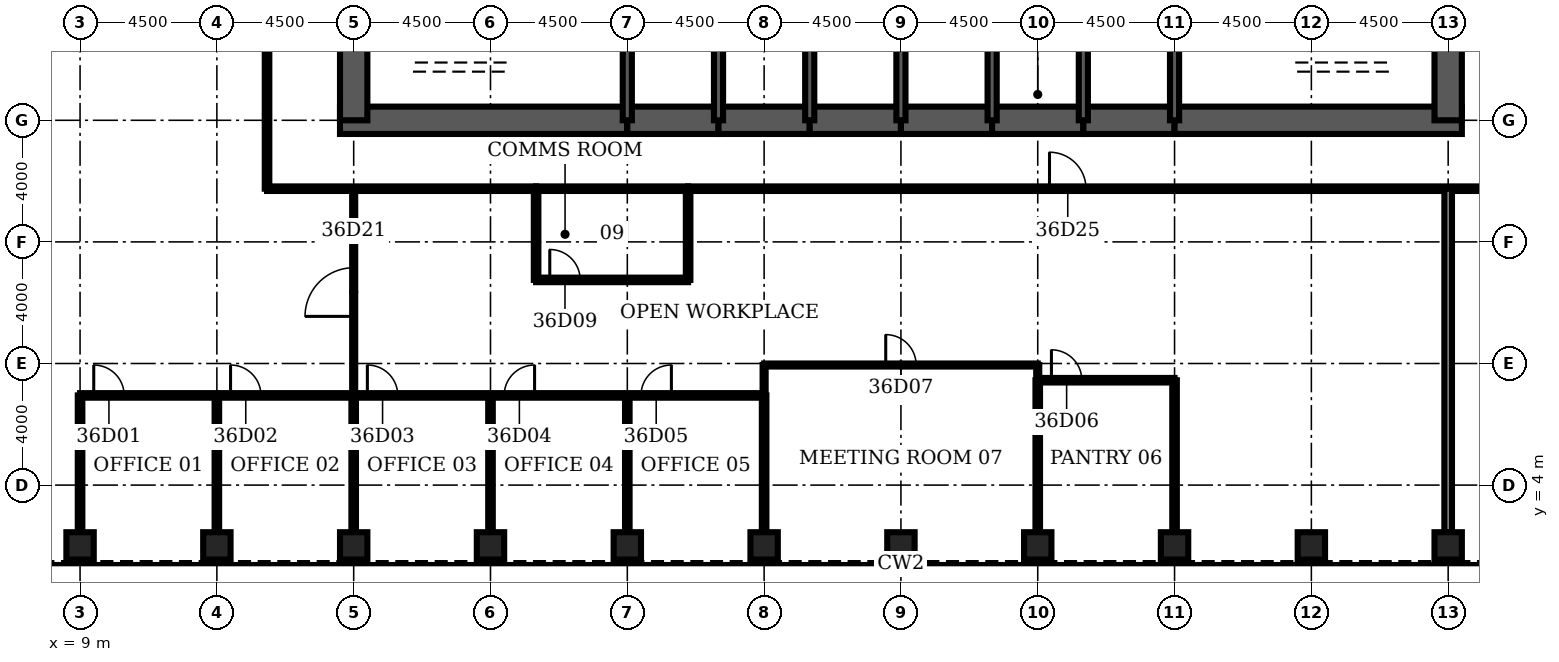
"""IFC4 building model, lengths in metres.
Left out: names, types, materials, properties, quantities, classifications, styles, units other than length and angle.
Written with IfcOpenShell. Run it as: python <this file> out.ifc"""

import sys

from ifc_helpers import new_model, si_unit, direction, frame, frame_2d, origin, origin_2d, place, context, subcontext, project, spatial, rectangle, hollow_rectangle, extrude, element, fill, save


model = new_model("IFC4")
c1 = context("Model", 3, precision=1e-05, world=origin(), true_north=direction((0.0, 1.0)))
c2 = subcontext(c1, "Body", "Model", "MODEL_VIEW")
j1 = project(units=[si_unit("LENGTHUNIT", "METRE"), si_unit("PLANEANGLEUNIT", "RADIAN")], contexts=[c1])
p1 = place(None, origin())
s1 = spatial("IfcSite", under=j1, at=p1, CompositionType="ELEMENT")
p2 = place(p1, origin())
s2 = spatial("IfcBuilding", under=s1, at=p2, CompositionType="ELEMENT")
p3 = place(p2, frame((0.0, 0.0, 163.5)))
s3 = spatial("IfcBuildingStorey", under=s2, at=p3, CompositionType="ELEMENT", Elevation=163.5)
for number, where, z_axis, x_axis in (
    (1, (9.0, 2.0, 0.0), (0.0, 0.0, 1.0), (0.0, 1.0, 0.0)),
    (2, (13.5, 2.0, 0.0), (0.0, 0.0, 1.0), (0.0, 1.0, 0.0)),
    (3, (18.0, 2.0, 0.0), (0.0, 0.0, 1.0), (0.0, 1.0, 0.0)),
    (4, (22.5, 2.0, 0.0), (0.0, 0.0, 1.0), (0.0, 1.0, 0.0)),
    (5, (27.0, 2.0, 0.0), (0.0, 0.0, 1.0), (0.0, 1.0, 0.0)),
    (6, (31.5, 2.0, 0.0), (0.0, 0.0, 1.0), (0.0, 1.0, 0.0)),
    (7, (36.0, 2.0, 0.0), (0.0, 0.0, 1.0), (0.0, 1.0, 0.0)),
    (8, (40.5, 2.0, 0.0), (0.0, 0.0, 1.0), (0.0, 1.0, 0.0)),
    (9, (45.0, 2.0, 0.0), (0.0, 0.0, 1.0), (0.0, 1.0, 0.0)),
    (10, (49.5, 2.0, 0.0), (0.0, 0.0, 1.0), (0.0, 1.0, 0.0)),
    (11, (54.0, 2.0, 0.0), (0.0, 0.0, 1.0), (0.0, 1.0, 0.0)),
):
    element("IfcColumn", number, at=place(p3, frame(where, z_axis=z_axis, x_axis=x_axis)), inside=s3, PredefinedType="COLUMN", context=c2, shape_type="SweptSolid", body=[
        extrude(hollow_rectangle(XDim=0.9, YDim=0.9, WallThickness=0.09, at=origin_2d()), origin(), (0.0, 0.0, 1.0), 4.2),
    ])
p4 = place(p3, frame((17.55, 16.0, 0.0), z_axis=(0.0, 0.0, 1.0), x_axis=(1.0, 0.0, 0.0)))
e12 = element("IfcWall", 12, at=p4, inside=s3, PredefinedType="SHEAR", context=c2, shape_type="SweptSolid", body=[
    extrude(rectangle(XDim=9.45, YDim=0.9, at=frame_2d((4.725, 0.0))), origin(), (0.0, 0.0, 1.0), 4.2),
])
for number, where, z_axis, x_axis in (
    (13, (27.0, 16.0, 0.0), (0.0, 0.0, 1.0), (1.0, 0.0, 0.0)),
    (14, (30.0, 16.0, 0.0), (0.0, 0.0, 1.0), (1.0, 0.0, 0.0)),
    (15, (33.0, 16.0, 0.0), (0.0, 0.0, 1.0), (1.0, 0.0, 0.0)),
    (16, (36.0, 16.0, 0.0), (0.0, 0.0, 1.0), (1.0, 0.0, 0.0)),
    (17, (39.0, 16.0, 0.0), (0.0, 0.0, 1.0), (1.0, 0.0, 0.0)),
    (18, (42.0, 16.0, 0.0), (0.0, 0.0, 1.0), (1.0, 0.0, 0.0)),
):
    element("IfcWall", number, at=place(p3, frame(where, z_axis=z_axis, x_axis=x_axis)), inside=s3, PredefinedType="SHEAR", context=c2, shape_type="SweptSolid", body=[
        extrude(rectangle(XDim=3.0, YDim=0.9, at=frame_2d((1.5, 0.0))), origin(), (0.0, 0.0, 1.0), 4.2),
    ])
p5 = place(p3, frame((45.0, 16.0, 0.0), z_axis=(0.0, 0.0, 1.0), x_axis=(1.0, 0.0, 0.0)))
e19 = element("IfcWall", 19, at=p5, inside=s3, PredefinedType="SHEAR", context=c2, shape_type="SweptSolid", body=[
    extrude(rectangle(XDim=9.45, YDim=0.9, at=frame_2d((4.725, 0.0))), origin(), (0.0, 0.0, 1.0), 4.2),
])
for number, where, z_axis, x_axis in (
    (20, (18.0, 19.2, 0.0), (0.0, 0.0, 1.0), (0.0, -1.0, 0.0)),
    (21, (54.0, 16.0, 0.0), (0.0, 0.0, 1.0), (0.0, 1.0, 0.0)),
):
    element("IfcWall", number, at=place(p3, frame(where, z_axis=z_axis, x_axis=x_axis)), inside=s3, PredefinedType="SHEAR", context=c2, shape_type="SweptSolid", body=[
        extrude(rectangle(XDim=3.2, YDim=0.9, at=frame_2d((1.6, 0.0))), origin(), (0.0, 0.0, 1.0), 4.2),
    ])
for number, where, z_axis, x_axis in (
    (22, (27.0, 16.0, 0.0), (0.0, 0.0, 1.0), (0.0, 1.0, 0.0)),
    (23, (30.0, 16.0, 0.0), (0.0, 0.0, 1.0), (0.0, 1.0, 0.0)),
    (24, (33.0, 16.0, 0.0), (0.0, 0.0, 1.0), (0.0, 1.0, 0.0)),
    (25, (36.0, 16.0, 0.0), (0.0, 0.0, 1.0), (0.0, 1.0, 0.0)),
    (26, (39.0, 16.0, 0.0), (0.0, 0.0, 1.0), (0.0, 1.0, 0.0)),
    (27, (42.0, 16.0, 0.0), (0.0, 0.0, 1.0), (0.0, 1.0, 0.0)),
    (28, (45.0, 16.0, 0.0), (0.0, 0.0, 1.0), (0.0, 1.0, 0.0)),
):
    element("IfcWall", number, at=place(p3, frame(where, z_axis=z_axis, x_axis=x_axis)), inside=s3, PredefinedType="SOLIDWALL", context=c2, shape_type="SweptSolid", body=[
        extrude(rectangle(XDim=3.2, YDim=0.3, at=frame_2d((1.6, 0.0))), origin(), (0.0, 0.0, 1.0), 4.2),
    ])
p6 = place(p3, frame((39.15, 17.4, 0.0), z_axis=(0.0, 0.0, 1.0), x_axis=(1.0, 0.0, 0.0)))
e29 = element("IfcWall", 29, at=p6, inside=s3, PredefinedType="SOLIDWALL", context=c2, shape_type="SweptSolid", body=[
    extrude(rectangle(XDim=2.7, YDim=0.3, at=frame_2d((1.35, 0.0))), origin(), (0.0, 0.0, 1.0), 4.04),
])
p7 = place(p6, frame((0.85, 0.0, 0.0)))
e30 = element("IfcOpeningElement", 30, at=p7, cuts=e29, PredefinedType="OPENING", context=c2, shape_type="SweptSolid", body=[
    extrude(rectangle(XDim=1.0, YDim=2.1, at=frame_2d((0.5, 1.05))), frame((0.0, 0.16, 0.0), z_axis=(0.0, -1.0, 0.0), x_axis=(1.0, 0.0, 0.0)), (0.0, 0.0, 1.0), 0.32),
])
p8 = place(p3, frame((9.0, 6.95, 0.0), z_axis=(0.0, 0.0, 1.0), x_axis=(1.0, 0.0, 0.0)))
e31 = element("IfcWall", 31, at=p8, inside=s3, PredefinedType="PARTITIONING", context=c2, shape_type="SweptSolid", body=[
    extrude(rectangle(XDim=22.5, YDim=0.15, at=frame_2d((11.25, 0.0))), origin(), (0.0, 0.0, 1.0), 3.0),
])
p9 = place(p8, frame((0.45, 0.0, 0.0)))
e32 = element("IfcOpeningElement", 32, at=p9, cuts=e31, PredefinedType="OPENING", context=c2, shape_type="SweptSolid", body=[
    extrude(rectangle(XDim=1.0, YDim=2.1, at=frame_2d((0.5, 1.05))), frame((0.0, 0.085, 0.0), z_axis=(0.0, -1.0, 0.0), x_axis=(1.0, 0.0, 0.0)), (0.0, 0.0, 1.0), 0.17),
])
p10 = place(p8, frame((4.95, 0.0, 0.0)))
e33 = element("IfcOpeningElement", 33, at=p10, cuts=e31, PredefinedType="OPENING", context=c2, shape_type="SweptSolid", body=[
    extrude(rectangle(XDim=1.0, YDim=2.1, at=frame_2d((0.5, 1.05))), frame((0.0, 0.085, 0.0), z_axis=(0.0, -1.0, 0.0), x_axis=(1.0, 0.0, 0.0)), (0.0, 0.0, 1.0), 0.17),
])
p11 = place(p8, frame((9.45, 0.0, 0.0)))
e34 = element("IfcOpeningElement", 34, at=p11, cuts=e31, PredefinedType="OPENING", context=c2, shape_type="SweptSolid", body=[
    extrude(rectangle(XDim=1.0, YDim=2.1, at=frame_2d((0.5, 1.05))), frame((0.0, 0.085, 0.0), z_axis=(0.0, -1.0, 0.0), x_axis=(1.0, 0.0, 0.0)), (0.0, 0.0, 1.0), 0.17),
])
p12 = place(p8, frame((13.95, 0.0, 0.0)))
e35 = element("IfcOpeningElement", 35, at=p12, cuts=e31, PredefinedType="OPENING", context=c2, shape_type="SweptSolid", body=[
    extrude(rectangle(XDim=1.0, YDim=2.1, at=frame_2d((0.5, 1.05))), frame((0.0, 0.085, 0.0), z_axis=(0.0, -1.0, 0.0), x_axis=(1.0, 0.0, 0.0)), (0.0, 0.0, 1.0), 0.17),
])
p13 = place(p8, frame((18.45, 0.0, 0.0)))
e36 = element("IfcOpeningElement", 36, at=p13, cuts=e31, PredefinedType="OPENING", context=c2, shape_type="SweptSolid", body=[
    extrude(rectangle(XDim=1.0, YDim=2.1, at=frame_2d((0.5, 1.05))), frame((0.0, 0.085, 0.0), z_axis=(0.0, -1.0, 0.0), x_axis=(1.0, 0.0, 0.0)), (0.0, 0.0, 1.0), 0.17),
])
p14 = place(p3, frame((40.5, 7.45, 0.0), z_axis=(0.0, 0.0, 1.0), x_axis=(1.0, 0.0, 0.0)))
e37 = element("IfcWall", 37, at=p14, inside=s3, PredefinedType="PARTITIONING", context=c2, shape_type="SweptSolid", body=[
    extrude(rectangle(XDim=4.5, YDim=0.15, at=frame_2d((2.25, 0.0))), origin(), (0.0, 0.0, 1.0), 3.0),
])
p15 = place(p14, frame((0.45, 0.0, 0.0)))
e38 = element("IfcOpeningElement", 38, at=p15, cuts=e37, PredefinedType="OPENING", context=c2, shape_type="SweptSolid", body=[
    extrude(rectangle(XDim=1.0, YDim=2.1, at=frame_2d((0.5, 1.05))), frame((0.0, 0.085, 0.0), z_axis=(0.0, -1.0, 0.0), x_axis=(1.0, 0.0, 0.0)), (0.0, 0.0, 1.0), 0.17),
])
p16 = place(p3, frame((31.5, 7.95, 0.0), z_axis=(0.0, 0.0, 1.0), x_axis=(1.0, 0.0, 0.0)))
e39 = element("IfcWall", 39, at=p16, inside=s3, PredefinedType="PARTITIONING", context=c2, shape_type="SweptSolid", body=[
    extrude(rectangle(XDim=9.0, YDim=0.1, at=frame_2d((4.5, 0.0))), origin(), (0.0, 0.0, 1.0), 3.0),
])
p17 = place(p16, frame((4.0, 0.0, 0.0)))
e40 = element("IfcOpeningElement", 40, at=p17, cuts=e39, PredefinedType="OPENING", context=c2, shape_type="SweptSolid", body=[
    extrude(rectangle(XDim=1.0, YDim=2.1, at=frame_2d((0.5, 1.05))), frame((0.0, 0.06, 0.0), z_axis=(0.0, -1.0, 0.0), x_axis=(1.0, 0.0, 0.0)), (0.0, 0.0, 1.0), 0.12),
])
p18 = place(p3, frame((24.0, 10.75, 0.0), z_axis=(0.0, 0.0, 1.0), x_axis=(1.0, 0.0, 0.0)))
e41 = element("IfcWall", 41, at=p18, inside=s3, PredefinedType="PARTITIONING", context=c2, shape_type="SweptSolid", body=[
    extrude(rectangle(XDim=5.0, YDim=0.15, at=frame_2d((2.5, 0.0))), origin(), (0.0, 0.0, 1.0), 3.0),
])
p19 = place(p18, frame((0.45, 0.0, 0.0)))
e42 = element("IfcOpeningElement", 42, at=p19, cuts=e41, PredefinedType="OPENING", context=c2, shape_type="SweptSolid", body=[
    extrude(rectangle(XDim=1.0, YDim=2.1, at=frame_2d((0.5, 1.05))), frame((0.0, 0.085, 0.0), z_axis=(0.0, -1.0, 0.0), x_axis=(1.0, 0.0, 0.0)), (0.0, 0.0, 1.0), 0.17),
])
p20 = place(p3, frame((15.15, 13.75, 0.0), z_axis=(0.0, 0.0, 1.0), x_axis=(1.0, 0.0, 0.0)))
e43 = element("IfcWall", 43, at=p20, inside=s3, PredefinedType="PARTITIONING", context=c2, shape_type="SweptSolid", body=[
    extrude(rectangle(XDim=8.85, YDim=0.15, at=frame_2d((4.425, 0.0))), origin(), (0.0, 0.0, 1.0), 3.0),
])
p21 = place(p3, frame((24.0, 13.75, 0.0), z_axis=(0.0, 0.0, 1.0), x_axis=(1.0, 0.0, 0.0)))
e44 = element("IfcWall", 44, at=p21, inside=s3, PredefinedType="PARTITIONING", context=c2, shape_type="SweptSolid", body=[
    extrude(rectangle(XDim=5.0, YDim=0.15, at=frame_2d((2.5, 0.0))), origin(), (0.0, 0.0, 1.0), 3.0),
])
p22 = place(p3, frame((29.0, 13.75, 0.0), z_axis=(0.0, 0.0, 1.0), x_axis=(1.0, 0.0, 0.0)))
e45 = element("IfcWall", 45, at=p22, inside=s3, PredefinedType="PARTITIONING", context=c2, shape_type="SweptSolid", body=[
    extrude(rectangle(XDim=27.85, YDim=0.15, at=frame_2d((13.925, 0.0))), origin(), (0.0, 0.0, 1.0), 3.0),
])
p23 = place(p22, frame((11.887, 0.0, 0.0)))
e46 = element("IfcOpeningElement", 46, at=p23, cuts=e45, PredefinedType="OPENING", context=c2, shape_type="SweptSolid", body=[
    extrude(rectangle(XDim=1.2, YDim=2.1, at=frame_2d((0.6, 1.05))), frame((0.0, 0.085, 0.0), z_axis=(0.0, -1.0, 0.0), x_axis=(1.0, 0.0, 0.0)), (0.0, 0.0, 1.0), 0.17),
])
for number, where, z_axis, x_axis in (
    (47, (9.0, 2.45, 0.0), (0.0, 0.0, 1.0), (0.0, 1.0, 0.0)),
    (48, (13.5, 2.45, 0.0), (0.0, 0.0, 1.0), (0.0, 1.0, 0.0)),
):
    element("IfcWall", number, at=place(p3, frame(where, z_axis=z_axis, x_axis=x_axis)), inside=s3, PredefinedType="PARTITIONING", context=c2, shape_type="SweptSolid", body=[
        extrude(rectangle(XDim=4.5, YDim=0.15, at=frame_2d((2.25, 0.0))), origin(), (0.0, 0.0, 1.0), 3.0),
    ])
p24 = place(p3, frame((15.15, 13.75, 0.0), z_axis=(0.0, 0.0, 1.0), x_axis=(0.0, 1.0, 0.0)))
e49 = element("IfcWall", 49, at=p24, inside=s3, PredefinedType="PARTITIONING", context=c2, shape_type="SweptSolid", body=[
    extrude(rectangle(XDim=20.5, YDim=0.15, at=frame_2d((10.25, 0.0))), origin(), (0.0, 0.0, 1.0), 3.0),
])
p25 = place(p24, frame((9.65, 0.0, 0.0)))
e50 = element("IfcOpeningElement", 50, at=p25, cuts=e49, PredefinedType="OPENING", context=c2, shape_type="SweptSolid", body=[
    extrude(rectangle(XDim=1.2, YDim=2.1, at=frame_2d((0.6, 1.05))), frame((0.0, 0.085, 0.0), z_axis=(0.0, -1.0, 0.0), x_axis=(1.0, 0.0, 0.0)), (0.0, 0.0, 1.0), 0.17),
])
p26 = place(p3, frame((18.0, 2.45, 0.0), z_axis=(0.0, 0.0, 1.0), x_axis=(0.0, 1.0, 0.0)))
e51 = element("IfcWall", 51, at=p26, inside=s3, PredefinedType="PARTITIONING", context=c2, shape_type="SweptSolid", body=[
    extrude(rectangle(XDim=4.5, YDim=0.15, at=frame_2d((2.25, 0.0))), origin(), (0.0, 0.0, 1.0), 3.0),
])
p27 = place(p3, frame((18.0, 6.95, 0.0), z_axis=(0.0, 0.0, 1.0), x_axis=(0.0, 1.0, 0.0)))
e52 = element("IfcWall", 52, at=p27, inside=s3, PredefinedType="PARTITIONING", context=c2, shape_type="SweptSolid", body=[
    extrude(rectangle(XDim=6.8, YDim=0.1, at=frame_2d((3.4, 0.0))), origin(), (0.0, 0.0, 1.0), 3.0),
])
p28 = place(p27, frame((2.6, 0.0, 0.0)))
e53 = element("IfcOpeningElement", 53, at=p28, cuts=e52, PredefinedType="OPENING", context=c2, shape_type="SweptSolid", body=[
    extrude(rectangle(XDim=1.6, YDim=2.1, at=frame_2d((0.8, 1.05))), frame((0.0, 0.06, 0.0), z_axis=(0.0, -1.0, 0.0), x_axis=(1.0, 0.0, 0.0)), (0.0, 0.0, 1.0), 0.12),
])
p29 = place(p3, frame((22.5, 2.45, 0.0), z_axis=(0.0, 0.0, 1.0), x_axis=(0.0, 1.0, 0.0)))
e54 = element("IfcWall", 54, at=p29, inside=s3, PredefinedType="PARTITIONING", context=c2, shape_type="SweptSolid", body=[
    extrude(rectangle(XDim=4.5, YDim=0.15, at=frame_2d((2.25, 0.0))), origin(), (0.0, 0.0, 1.0), 3.0),
])
p30 = place(p3, frame((24.0, 10.75, 0.0), z_axis=(0.0, 0.0, 1.0), x_axis=(0.0, 1.0, 0.0)))
e55 = element("IfcWall", 55, at=p30, inside=s3, PredefinedType="PARTITIONING", context=c2, shape_type="SweptSolid", body=[
    extrude(rectangle(XDim=3.0, YDim=0.15, at=frame_2d((1.5, 0.0))), origin(), (0.0, 0.0, 1.0), 3.0),
])
p31 = place(p3, frame((27.0, 2.45, 0.0), z_axis=(0.0, 0.0, 1.0), x_axis=(0.0, 1.0, 0.0)))
e56 = element("IfcWall", 56, at=p31, inside=s3, PredefinedType="PARTITIONING", context=c2, shape_type="SweptSolid", body=[
    extrude(rectangle(XDim=4.5, YDim=0.15, at=frame_2d((2.25, 0.0))), origin(), (0.0, 0.0, 1.0), 3.0),
])
p32 = place(p3, frame((29.0, 10.75, 0.0), z_axis=(0.0, 0.0, 1.0), x_axis=(0.0, 1.0, 0.0)))
e57 = element("IfcWall", 57, at=p32, inside=s3, PredefinedType="PARTITIONING", context=c2, shape_type="SweptSolid", body=[
    extrude(rectangle(XDim=3.0, YDim=0.15, at=frame_2d((1.5, 0.0))), origin(), (0.0, 0.0, 1.0), 3.0),
])
p33 = place(p3, frame((31.5, 2.45, 0.0), z_axis=(0.0, 0.0, 1.0), x_axis=(0.0, 1.0, 0.0)))
e58 = element("IfcWall", 58, at=p33, inside=s3, PredefinedType="PARTITIONING", context=c2, shape_type="SweptSolid", body=[
    extrude(rectangle(XDim=4.5, YDim=0.15, at=frame_2d((2.25, 0.0))), origin(), (0.0, 0.0, 1.0), 3.0),
])
p34 = place(p3, frame((31.5, 6.95, 0.0), z_axis=(0.0, 0.0, 1.0), x_axis=(0.0, 1.0, 0.0)))
e59 = element("IfcWall", 59, at=p34, inside=s3, PredefinedType="PARTITIONING", context=c2, shape_type="SweptSolid", body=[
    extrude(rectangle(XDim=1.0, YDim=0.1, at=frame_2d((0.5, 0.0))), origin(), (0.0, 0.0, 1.0), 3.0),
])
p35 = place(p3, frame((40.5, 2.45, 0.0), z_axis=(0.0, 0.0, 1.0), x_axis=(0.0, 1.0, 0.0)))
e60 = element("IfcWall", 60, at=p35, inside=s3, PredefinedType="PARTITIONING", context=c2, shape_type="SweptSolid", body=[
    extrude(rectangle(XDim=5.0, YDim=0.15, at=frame_2d((2.5, 0.0))), origin(), (0.0, 0.0, 1.0), 3.0),
])
p36 = place(p3, frame((40.5, 7.45, 0.0), z_axis=(0.0, 0.0, 1.0), x_axis=(0.0, 1.0, 0.0)))
e61 = element("IfcWall", 61, at=p36, inside=s3, PredefinedType="PARTITIONING", context=c2, shape_type="SweptSolid", body=[
    extrude(rectangle(XDim=0.5, YDim=0.1, at=frame_2d((0.25, 0.0))), origin(), (0.0, 0.0, 1.0), 3.0),
])
p37 = place(p3, frame((45.0, 2.45, 0.0), z_axis=(0.0, 0.0, 1.0), x_axis=(0.0, 1.0, 0.0)))
e62 = element("IfcWall", 62, at=p37, inside=s3, PredefinedType="PARTITIONING", context=c2, shape_type="SweptSolid", body=[
    extrude(rectangle(XDim=5.0, YDim=0.15, at=frame_2d((2.5, 0.0))), origin(), (0.0, 0.0, 1.0), 3.0),
])
p38 = place(p3, frame((54.0, 2.45, 0.0), z_axis=(0.0, 0.0, 1.0), x_axis=(0.0, 1.0, 0.0)))
e63 = element("IfcWall", 63, at=p38, inside=s3, PredefinedType="PARTITIONING", context=c2, shape_type="SweptSolid", body=[
    extrude(rectangle(XDim=11.3, YDim=0.25, at=frame_2d((5.65, 0.0))), origin(), (0.0, 0.0, 1.0), 3.0),
])
p39 = place(p7, origin())
e64 = element("IfcDoor", 64, at=p39, inside=s3, OperationType="SINGLE_SWING_LEFT", PredefinedType="DOOR", context=c2, shape_type="SweptSolid", body=[
    extrude(rectangle(XDim=1.0, YDim=2.1, at=frame_2d((0.5, 1.05))), frame((0.0, 0.025, 0.0), z_axis=(0.0, -1.0, 0.0), x_axis=(1.0, 0.0, 0.0)), (0.0, 0.0, 1.0), 0.05),
])
fill(e30, e64)
p40 = place(p9, origin())
e65 = element("IfcDoor", 65, at=p40, inside=s3, OperationType="SINGLE_SWING_LEFT", PredefinedType="DOOR", context=c2, shape_type="SweptSolid", body=[
    extrude(rectangle(XDim=1.0, YDim=2.1, at=frame_2d((0.5, 1.05))), frame((0.0, 0.025, 0.0), z_axis=(0.0, -1.0, 0.0), x_axis=(1.0, 0.0, 0.0)), (0.0, 0.0, 1.0), 0.05),
])
fill(e32, e65)
p41 = place(p10, origin())
e66 = element("IfcDoor", 66, at=p41, inside=s3, OperationType="SINGLE_SWING_LEFT", PredefinedType="DOOR", context=c2, shape_type="SweptSolid", body=[
    extrude(rectangle(XDim=1.0, YDim=2.1, at=frame_2d((0.5, 1.05))), frame((0.0, 0.025, 0.0), z_axis=(0.0, -1.0, 0.0), x_axis=(1.0, 0.0, 0.0)), (0.0, 0.0, 1.0), 0.05),
])
fill(e33, e66)
p42 = place(p11, origin())
e67 = element("IfcDoor", 67, at=p42, inside=s3, OperationType="SINGLE_SWING_LEFT", PredefinedType="DOOR", context=c2, shape_type="SweptSolid", body=[
    extrude(rectangle(XDim=1.0, YDim=2.1, at=frame_2d((0.5, 1.05))), frame((0.0, 0.025, 0.0), z_axis=(0.0, -1.0, 0.0), x_axis=(1.0, 0.0, 0.0)), (0.0, 0.0, 1.0), 0.05),
])
fill(e34, e67)
p43 = place(p12, origin())
e68 = element("IfcDoor", 68, at=p43, inside=s3, OperationType="SINGLE_SWING_RIGHT", PredefinedType="DOOR", context=c2, shape_type="SweptSolid", body=[
    extrude(rectangle(XDim=1.0, YDim=2.1, at=frame_2d((0.5, 1.05))), frame((0.0, 0.025, 0.0), z_axis=(0.0, -1.0, 0.0), x_axis=(1.0, 0.0, 0.0)), (0.0, 0.0, 1.0), 0.05),
])
fill(e35, e68)
p44 = place(p13, origin())
e69 = element("IfcDoor", 69, at=p44, inside=s3, OperationType="SINGLE_SWING_RIGHT", PredefinedType="DOOR", context=c2, shape_type="SweptSolid", body=[
    extrude(rectangle(XDim=1.0, YDim=2.1, at=frame_2d((0.5, 1.05))), frame((0.0, 0.025, 0.0), z_axis=(0.0, -1.0, 0.0), x_axis=(1.0, 0.0, 0.0)), (0.0, 0.0, 1.0), 0.05),
])
fill(e36, e69)
p45 = place(p15, origin())
e70 = element("IfcDoor", 70, at=p45, inside=s3, OperationType="SINGLE_SWING_LEFT", PredefinedType="DOOR", context=c2, shape_type="SweptSolid", body=[
    extrude(rectangle(XDim=1.0, YDim=2.1, at=frame_2d((0.5, 1.05))), frame((0.0, 0.025, 0.0), z_axis=(0.0, -1.0, 0.0), x_axis=(1.0, 0.0, 0.0)), (0.0, 0.0, 1.0), 0.05),
])
fill(e38, e70)
p46 = place(p17, origin())
e71 = element("IfcDoor", 71, at=p46, inside=s3, OperationType="SINGLE_SWING_LEFT", PredefinedType="DOOR", context=c2, shape_type="SweptSolid", body=[
    extrude(rectangle(XDim=1.0, YDim=2.1, at=frame_2d((0.5, 1.05))), frame((0.0, 0.025, 0.0), z_axis=(0.0, -1.0, 0.0), x_axis=(1.0, 0.0, 0.0)), (0.0, 0.0, 1.0), 0.05),
])
fill(e40, e71)
p47 = place(p19, origin())
e72 = element("IfcDoor", 72, at=p47, inside=s3, OperationType="SINGLE_SWING_LEFT", PredefinedType="DOOR", context=c2, shape_type="SweptSolid", body=[
    extrude(rectangle(XDim=1.0, YDim=2.1, at=frame_2d((0.5, 1.05))), frame((0.0, 0.025, 0.0), z_axis=(0.0, -1.0, 0.0), x_axis=(1.0, 0.0, 0.0)), (0.0, 0.0, 1.0), 0.05),
])
fill(e42, e72)
p48 = place(p28, origin())
e73 = element("IfcDoor", 73, at=p48, inside=s3, OperationType="SINGLE_SWING_LEFT", PredefinedType="DOOR", context=c2, shape_type="SweptSolid", body=[
    extrude(rectangle(XDim=1.6, YDim=2.1, at=frame_2d((0.8, 1.05))), frame((0.0, 0.025, 0.0), z_axis=(0.0, -1.0, 0.0), x_axis=(1.0, 0.0, 0.0)), (0.0, 0.0, 1.0), 0.05),
])
fill(e53, e73)
p49 = place(p23, origin())
e74 = element("IfcDoor", 74, at=p49, inside=s3, OperationType="SINGLE_SWING_LEFT", PredefinedType="DOOR", context=c2, shape_type="SweptSolid", body=[
    extrude(rectangle(XDim=1.2, YDim=2.1, at=frame_2d((0.6, 1.05))), frame((0.0, 0.025, 0.0), z_axis=(0.0, -1.0, 0.0), x_axis=(1.0, 0.0, 0.0)), (0.0, 0.0, 1.0), 0.05),
])
fill(e46, e74)
save(model, sys.argv[1])
